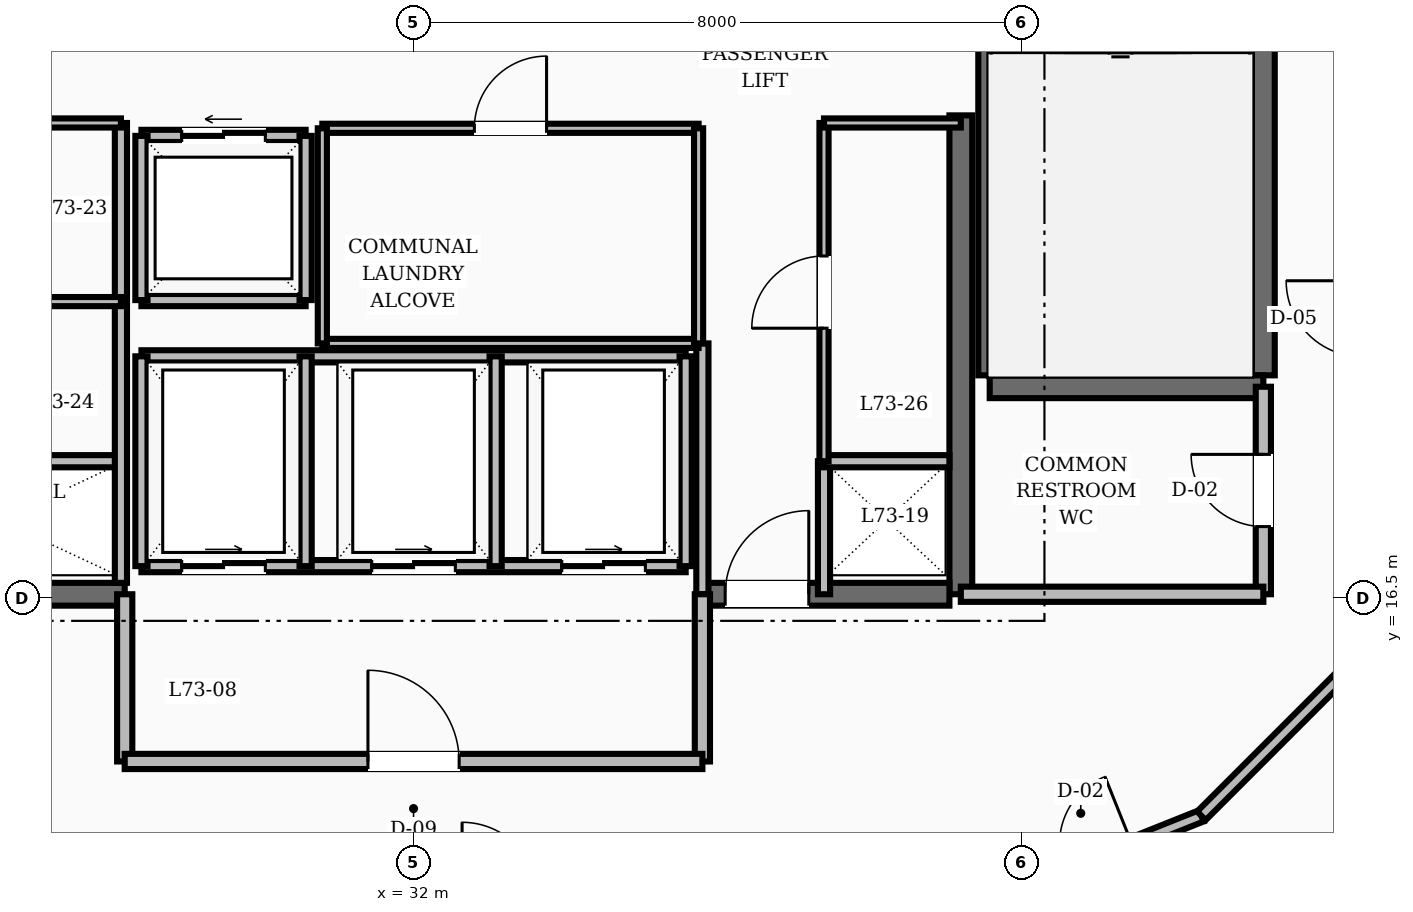
"""IFC4 building model, lengths in metres.
Left out: names, types, materials, properties, quantities, classifications, styles, units other than length and angle.
Written with IfcOpenShell. Run it as: python <this file> out.ifc"""

import sys

from ifc_helpers import new_model, si_unit, direction, frame, frame_2d, origin, place, context, subcontext, project, spatial, rectangle, extrude, element, fill, save


model = new_model("IFC4")
c1 = context("Model", 3, precision=1e-05, world=origin(), true_north=direction((0.0, 1.0)))
c2 = subcontext(c1, "Body", "Model", "MODEL_VIEW")
j1 = project(units=[si_unit("LENGTHUNIT", "METRE"), si_unit("PLANEANGLEUNIT", "RADIAN")], contexts=[c1])
p1 = place(None, origin())
s1 = spatial("IfcSite", under=j1, at=p1, CompositionType="ELEMENT")
p2 = place(p1, origin())
s2 = spatial("IfcBuilding", under=s1, at=p2, CompositionType="ELEMENT")
p3 = place(p2, frame((0.0, 0.0, 279.6)))
s3 = spatial("IfcBuildingStorey", under=s2, at=p3, CompositionType="ELEMENT", Elevation=279.6)
p4 = place(p3, frame((39.2, 16.55, 0.0), z_axis=(0.0, 0.0, 1.0), x_axis=(0.0, 1.0, 0.0)))
e1 = element("IfcWall", 1, at=p4, inside=s3, PredefinedType="SHEAR", context=c2, shape_type="SweptSolid", body=[
    extrude(rectangle(XDim=6.3, YDim=0.3, at=frame_2d((3.15, 0.0))), origin(), (0.0, 0.0, 1.0), 3.6),
])
p5 = place(p3, frame((24.95, 16.55, 0.0), z_axis=(0.0, 0.0, 1.0), x_axis=(1.0, 0.0, 0.0)))
e2 = element("IfcWall", 2, at=p5, inside=s3, PredefinedType="SHEAR", context=c2, shape_type="SweptSolid", body=[
    extrude(rectangle(XDim=3.25, YDim=0.3, at=frame_2d((1.625, 0.0))), origin(), (0.0, 0.0, 1.0), 3.6),
])
p6 = place(p3, frame((35.8, 16.55, 0.0), z_axis=(0.0, 0.0, 1.0), x_axis=(1.0, 0.0, 0.0)))
e3 = element("IfcWall", 3, at=p6, inside=s3, PredefinedType="SHEAR", context=c2, shape_type="SweptSolid", body=[
    extrude(rectangle(XDim=3.25, YDim=0.3, at=frame_2d((1.625, 0.0))), origin(), (0.0, 0.0, 1.0), 3.6),
])
p7 = place(p6, frame((0.3, 0.0, 0.0)))
e4 = element("IfcOpeningElement", 4, at=p7, cuts=e3, PredefinedType="OPENING", context=c2, shape_type="SweptSolid", body=[
    extrude(rectangle(XDim=1.1, YDim=2.1, at=frame_2d((0.55, 1.05))), frame((0.0, 0.16, 0.0), z_axis=(0.0, -1.0, 0.0), x_axis=(1.0, 0.0, 0.0)), (0.0, 0.0, 1.0), 0.32),
])
for number, where, z_axis, x_axis in (
    (5, (43.18, 19.43, 0.0), (0.0, 0.0, 1.0), (0.0, 1.0, 0.0)),
    (6, (39.58, 19.43, 0.0), (0.0, 0.0, 1.0), (0.0, 1.0, 0.0)),
):
    element("IfcWall", number, at=place(p3, frame(where, z_axis=z_axis, x_axis=x_axis)), inside=s3, PredefinedType="SHEAR", context=c2, shape_type="SweptSolid", body=[
        extrude(rectangle(XDim=8.74, YDim=0.3, at=frame_2d((4.37, 0.0))), origin(), (0.0, 0.0, 1.0), 3.6),
    ])
p8 = place(p3, frame((39.58, 19.28, 0.0), z_axis=(0.0, 0.0, 1.0), x_axis=(1.0, 0.0, 0.0)))
e7 = element("IfcWall", 7, at=p8, inside=s3, PredefinedType="SHEAR", context=c2, shape_type="SweptSolid", body=[
    extrude(rectangle(XDim=3.6, YDim=0.3, at=frame_2d((1.8, 0.0))), origin(), (0.0, 0.0, 1.0), 3.6),
])
p9 = place(p3, frame((43.18, 16.55, 0.0), z_axis=(0.0, 0.0, 1.0), x_axis=(0.0, 1.0, 0.0)))
e8 = element("IfcWall", 8, at=p9, inside=s3, PredefinedType="SOLIDWALL", context=c2, shape_type="SweptSolid", body=[
    extrude(rectangle(XDim=2.73, YDim=0.2, at=frame_2d((1.365, 0.0))), origin(), (0.0, 0.0, 1.0), 2.87),
])
p10 = place(p9, frame((0.89, 0.0, 0.0)))
e9 = element("IfcOpeningElement", 9, at=p10, cuts=e8, PredefinedType="OPENING", context=c2, shape_type="SweptSolid", body=[
    extrude(rectangle(XDim=0.95, YDim=2.1, at=frame_2d((0.475, 1.05))), frame((0.0, 0.11, 0.0), z_axis=(0.0, -1.0, 0.0), x_axis=(1.0, 0.0, 0.0)), (0.0, 0.0, 1.0), 0.22),
])
p11 = place(p3, frame((39.2, 16.55, 0.0), z_axis=(0.0, 0.0, 1.0), x_axis=(1.0, 0.0, 0.0)))
e10 = element("IfcWall", 10, at=p11, inside=s3, PredefinedType="SOLIDWALL", context=c2, shape_type="SweptSolid", body=[
    extrude(rectangle(XDim=3.98, YDim=0.2, at=frame_2d((1.99, 0.0))), origin(), (0.0, 0.0, 1.0), 2.87),
])
p12 = place(p3, frame((35.8, 16.55, 0.0), z_axis=(0.0, 0.0, 1.0), x_axis=(0.0, 1.0, 0.0)))
e11 = element("IfcWall", 11, at=p12, inside=s3, PredefinedType="SOLIDWALL", context=c2, shape_type="SweptSolid", body=[
    extrude(rectangle(XDim=3.3, YDim=0.16, at=frame_2d((1.65, 0.0))), origin(), (0.0, 0.0, 1.0), 2.87),
])
p13 = place(p3, frame((37.4, 16.55, 0.0), z_axis=(0.0, 0.0, 1.0), x_axis=(0.0, 1.0, 0.0)))
e12 = element("IfcWall", 12, at=p13, inside=s3, PredefinedType="SOLIDWALL", context=c2, shape_type="SweptSolid", body=[
    extrude(rectangle(XDim=1.75, YDim=0.16, at=frame_2d((0.875, 0.0))), origin(), (0.0, 0.0, 1.0), 2.87),
])
for number, where, z_axis, x_axis in (
    (13, (28.2, 14.35, 0.0), (0.0, 0.0, 1.0), (0.0, 1.0, 0.0)),
    (14, (35.8, 14.35, 0.0), (0.0, 0.0, 1.0), (0.0, 1.0, 0.0)),
):
    element("IfcWall", number, at=place(p3, frame(where, z_axis=z_axis, x_axis=x_axis)), inside=s3, PredefinedType="SOLIDWALL", context=c2, shape_type="SweptSolid", body=[
        extrude(rectangle(XDim=2.2, YDim=0.2, at=frame_2d((1.1, 0.0))), origin(), (0.0, 0.0, 1.0), 2.87),
    ])
p14 = place(p3, frame((28.2, 14.35, 0.0), z_axis=(0.0, 0.0, 1.0), x_axis=(1.0, 0.0, 0.0)))
e15 = element("IfcWall", 15, at=p14, inside=s3, PredefinedType="SOLIDWALL", context=c2, shape_type="SweptSolid", body=[
    extrude(rectangle(XDim=7.6, YDim=0.2, at=frame_2d((3.8, 0.0))), origin(), (0.0, 0.0, 1.0), 2.87),
])
p15 = place(p14, frame((3.2, 0.0, 0.0)))
e16 = element("IfcOpeningElement", 16, at=p15, cuts=e15, PredefinedType="OPENING", context=c2, shape_type="SweptSolid", body=[
    extrude(rectangle(XDim=1.2, YDim=2.1, at=frame_2d((0.6, 1.05))), frame((0.0, 0.11, 0.0), z_axis=(0.0, -1.0, 0.0), x_axis=(1.0, 0.0, 0.0)), (0.0, 0.0, 1.0), 0.22),
])
p16 = place(p3, frame((28.42, 22.58, 0.0), z_axis=(0.0, 0.0, 1.0), x_axis=(1.0, 0.0, 0.0)))
e17 = element("IfcWall", 17, at=p16, inside=s3, PredefinedType="SOLIDWALL", context=c2, shape_type="SweptSolid", body=[
    extrude(rectangle(XDim=2.16, YDim=0.16, at=frame_2d((1.08, 0.0))), origin(), (0.0, 0.0, 1.0), 2.87),
])
p17 = place(p16, frame((0.53, 0.0, 0.0)))
e18 = element("IfcOpeningElement", 18, at=p17, cuts=e17, PredefinedType="OPENING", context=c2, shape_type="SweptSolid", body=[
    extrude(rectangle(XDim=1.1, YDim=2.15, at=frame_2d((0.55, 1.075))), frame((0.0, 0.09, 0.0), z_axis=(0.0, -1.0, 0.0), x_axis=(1.0, 0.0, 0.0)), (0.0, 0.0, 1.0), 0.18),
])
for number, where, z_axis, x_axis in (
    (19, (28.42, 20.42, 0.0), (0.0, 0.0, 1.0), (1.0, 0.0, 0.0)),
    (20, (28.42, 20.42, 0.0), (0.0, 0.0, 1.0), (0.0, 1.0, 0.0)),
    (21, (30.58, 20.42, 0.0), (0.0, 0.0, 1.0), (0.0, 1.0, 0.0)),
):
    element("IfcWall", number, at=place(p3, frame(where, z_axis=z_axis, x_axis=x_axis)), inside=s3, PredefinedType="SOLIDWALL", context=c2, shape_type="SweptSolid", body=[
        extrude(rectangle(XDim=2.16, YDim=0.16, at=frame_2d((1.08, 0.0))), origin(), (0.0, 0.0, 1.0), 2.87),
    ])
p18 = place(p3, frame((28.42, 16.92, 0.0), z_axis=(0.0, 0.0, 1.0), x_axis=(1.0, 0.0, 0.0)))
e22 = element("IfcWall", 22, at=p18, inside=s3, PredefinedType="SOLIDWALL", context=c2, shape_type="SweptSolid", body=[
    extrude(rectangle(XDim=7.16, YDim=0.16, at=frame_2d((3.58, 0.0))), origin(), (0.0, 0.0, 1.0), 2.87),
])
p19 = place(p18, frame((0.53, 0.0, 0.0)))
e23 = element("IfcOpeningElement", 23, at=p19, cuts=e22, PredefinedType="OPENING", context=c2, shape_type="SweptSolid", body=[
    extrude(rectangle(XDim=1.1, YDim=2.15, at=frame_2d((0.55, 1.075))), frame((0.0, 0.09, 0.0), z_axis=(0.0, -1.0, 0.0), x_axis=(1.0, 0.0, 0.0)), (0.0, 0.0, 1.0), 0.18),
])
p20 = place(p18, frame((3.03, 0.0, 0.0)))
e24 = element("IfcOpeningElement", 24, at=p20, cuts=e22, PredefinedType="OPENING", context=c2, shape_type="SweptSolid", body=[
    extrude(rectangle(XDim=1.1, YDim=2.15, at=frame_2d((0.55, 1.075))), frame((0.0, 0.09, 0.0), z_axis=(0.0, -1.0, 0.0), x_axis=(1.0, 0.0, 0.0)), (0.0, 0.0, 1.0), 0.18),
])
p21 = place(p18, frame((5.53, 0.0, 0.0)))
e25 = element("IfcOpeningElement", 25, at=p21, cuts=e22, PredefinedType="OPENING", context=c2, shape_type="SweptSolid", body=[
    extrude(rectangle(XDim=1.1, YDim=2.15, at=frame_2d((0.55, 1.075))), frame((0.0, 0.09, 0.0), z_axis=(0.0, -1.0, 0.0), x_axis=(1.0, 0.0, 0.0)), (0.0, 0.0, 1.0), 0.18),
])
p22 = place(p3, frame((28.42, 19.68, 0.0), z_axis=(0.0, 0.0, 1.0), x_axis=(1.0, 0.0, 0.0)))
e26 = element("IfcWall", 26, at=p22, inside=s3, PredefinedType="SOLIDWALL", context=c2, shape_type="SweptSolid", body=[
    extrude(rectangle(XDim=7.16, YDim=0.16, at=frame_2d((3.58, 0.0))), origin(), (0.0, 0.0, 1.0), 2.87),
])
for number, where, z_axis, x_axis in (
    (27, (28.42, 16.92, 0.0), (0.0, 0.0, 1.0), (0.0, 1.0, 0.0)),
    (28, (30.58, 16.92, 0.0), (0.0, 0.0, 1.0), (0.0, 1.0, 0.0)),
    (29, (33.08, 16.92, 0.0), (0.0, 0.0, 1.0), (0.0, 1.0, 0.0)),
    (30, (35.58, 16.92, 0.0), (0.0, 0.0, 1.0), (0.0, 1.0, 0.0)),
):
    element("IfcWall", number, at=place(p3, frame(where, z_axis=z_axis, x_axis=x_axis)), inside=s3, PredefinedType="SOLIDWALL", context=c2, shape_type="SweptSolid", body=[
        extrude(rectangle(XDim=2.76, YDim=0.16, at=frame_2d((1.38, 0.0))), origin(), (0.0, 0.0, 1.0), 2.87),
    ])
p23 = place(p3, frame((30.8, 22.68, 0.0), z_axis=(0.0, 0.0, 1.0), x_axis=(1.0, 0.0, 0.0)))
e31 = element("IfcWall", 31, at=p23, inside=s3, PredefinedType="PARTITIONING", context=c2, shape_type="SweptSolid", body=[
    extrude(rectangle(XDim=4.95, YDim=0.12, at=frame_2d((2.475, 0.0))), origin(), (0.0, 0.0, 1.0), 2.87),
])
p24 = place(p23, frame((2.0, 0.0, 0.0)))
e32 = element("IfcOpeningElement", 32, at=p24, cuts=e31, PredefinedType="OPENING", context=c2, shape_type="SweptSolid", body=[
    extrude(rectangle(XDim=0.95, YDim=2.1, at=frame_2d((0.475, 1.05))), frame((0.0, 0.07, 0.0), z_axis=(0.0, -1.0, 0.0), x_axis=(1.0, 0.0, 0.0)), (0.0, 0.0, 1.0), 0.14),
])
p25 = place(p3, frame((30.8, 19.85, 0.0), z_axis=(0.0, 0.0, 1.0), x_axis=(1.0, 0.0, 0.0)))
e33 = element("IfcWall", 33, at=p25, inside=s3, PredefinedType="PARTITIONING", context=c2, shape_type="SweptSolid", body=[
    extrude(rectangle(XDim=4.95, YDim=0.12, at=frame_2d((2.475, 0.0))), origin(), (0.0, 0.0, 1.0), 2.87),
])
for number, where, z_axis, x_axis in (
    (34, (30.8, 19.85, 0.0), (0.0, 0.0, 1.0), (0.0, 1.0, 0.0)),
    (35, (35.75, 19.85, 0.0), (0.0, 0.0, 1.0), (0.0, 1.0, 0.0)),
):
    element("IfcWall", number, at=place(p3, frame(where, z_axis=z_axis, x_axis=x_axis)), inside=s3, PredefinedType="PARTITIONING", context=c2, shape_type="SweptSolid", body=[
        extrude(rectangle(XDim=2.83, YDim=0.12, at=frame_2d((1.415, 0.0))), origin(), (0.0, 0.0, 1.0), 2.87),
    ])
p26 = place(p3, frame((24.95, 18.3, 0.0), z_axis=(0.0, 0.0, 1.0), x_axis=(1.0, 0.0, 0.0)))
e36 = element("IfcWall", 36, at=p26, inside=s3, PredefinedType="SOLIDWALL", context=c2, shape_type="SweptSolid", body=[
    extrude(rectangle(XDim=3.2, YDim=0.16, at=frame_2d((1.6, 0.0))), origin(), (0.0, 0.0, 1.0), 2.87),
])
p27 = place(p3, frame((28.15, 16.7, 0.0), z_axis=(0.0, 0.0, 1.0), x_axis=(0.0, 1.0, 0.0)))
e37 = element("IfcWall", 37, at=p27, inside=s3, PredefinedType="SOLIDWALL", context=c2, shape_type="SweptSolid", body=[
    extrude(rectangle(XDim=6.05, YDim=0.16, at=frame_2d((3.025, 0.0))), origin(), (0.0, 0.0, 1.0), 2.87),
])
p28 = place(p3, frame((37.4, 18.3, 0.0), z_axis=(0.0, 0.0, 1.0), x_axis=(1.0, 0.0, 0.0)))
e38 = element("IfcWall", 38, at=p28, inside=s3, PredefinedType="SOLIDWALL", context=c2, shape_type="SweptSolid", body=[
    extrude(rectangle(XDim=1.65, YDim=0.16, at=frame_2d((0.825, 0.0))), origin(), (0.0, 0.0, 1.0), 2.87),
])
p29 = place(p3, frame((24.95, 22.75, 0.0), z_axis=(0.0, 0.0, 1.0), x_axis=(1.0, 0.0, 0.0)))
e39 = element("IfcWall", 39, at=p29, inside=s3, PredefinedType="PARTITIONING", context=c2, shape_type="SweptSolid", body=[
    extrude(rectangle(XDim=3.2, YDim=0.12, at=frame_2d((1.6, 0.0))), origin(), (0.0, 0.0, 1.0), 2.87),
])
p30 = place(p29, frame((1.125, 0.0, 0.0)))
e40 = element("IfcOpeningElement", 40, at=p30, cuts=e39, PredefinedType="OPENING", context=c2, shape_type="SweptSolid", body=[
    extrude(rectangle(XDim=0.95, YDim=2.1, at=frame_2d((0.475, 1.05))), frame((0.0, 0.07, 0.0), z_axis=(0.0, -1.0, 0.0), x_axis=(1.0, 0.0, 0.0)), (0.0, 0.0, 1.0), 0.14),
])
p31 = place(p3, frame((37.4, 18.3, 0.0), z_axis=(0.0, 0.0, 1.0), x_axis=(0.0, 1.0, 0.0)))
e41 = element("IfcWall", 41, at=p31, inside=s3, PredefinedType="PARTITIONING", context=c2, shape_type="SweptSolid", body=[
    extrude(rectangle(XDim=4.45, YDim=0.12, at=frame_2d((2.225, 0.0))), origin(), (0.0, 0.0, 1.0), 2.87),
])
p32 = place(p31, frame((1.75, 0.0, 0.0)))
e42 = element("IfcOpeningElement", 42, at=p32, cuts=e41, PredefinedType="OPENING", context=c2, shape_type="SweptSolid", body=[
    extrude(rectangle(XDim=0.95, YDim=2.1, at=frame_2d((0.475, 1.05))), frame((0.0, 0.07, 0.0), z_axis=(0.0, -1.0, 0.0), x_axis=(1.0, 0.0, 0.0)), (0.0, 0.0, 1.0), 0.14),
])
p33 = place(p3, frame((37.4, 22.75, 0.0), z_axis=(0.0, 0.0, 1.0), x_axis=(1.0, 0.0, 0.0)))
e43 = element("IfcWall", 43, at=p33, inside=s3, PredefinedType="PARTITIONING", context=c2, shape_type="SweptSolid", body=[
    extrude(rectangle(XDim=1.8, YDim=0.12, at=frame_2d((0.9, 0.0))), origin(), (0.0, 0.0, 1.0), 2.87),
])
p34 = place(p3, frame((24.95, 20.4, 0.0), z_axis=(0.0, 0.0, 1.0), x_axis=(1.0, 0.0, 0.0)))
e44 = element("IfcWall", 44, at=p34, inside=s3, PredefinedType="PARTITIONING", context=c2, shape_type="SweptSolid", body=[
    extrude(rectangle(XDim=3.2, YDim=0.12, at=frame_2d((1.6, 0.0))), origin(), (0.0, 0.0, 1.0), 2.87),
])
p35 = place(p34, frame((1.125, 0.0, 0.0)))
e45 = element("IfcOpeningElement", 45, at=p35, cuts=e44, PredefinedType="OPENING", context=c2, shape_type="SweptSolid", body=[
    extrude(rectangle(XDim=0.95, YDim=2.1, at=frame_2d((0.475, 1.05))), frame((0.0, 0.07, 0.0), z_axis=(0.0, -1.0, 0.0), x_axis=(1.0, 0.0, 0.0)), (0.0, 0.0, 1.0), 0.14),
])
p36 = place(p3, frame((39.651, 12.55, 0.0), z_axis=(0.0, 0.0, 1.0), x_axis=(0.92856882165, 0.371160266542, 0.0)))
e46 = element("IfcWall", 46, at=p36, inside=s3, PredefinedType="SOLIDWALL", context=c2, shape_type="SweptSolid", body=[
    extrude(rectangle(XDim=2.923, YDim=0.16, at=frame_2d((1.461, 0.0))), origin(), (0.0, 0.0, 1.0), 2.87),
])
p37 = place(p36, frame((0.987, 0.0, 0.0)))
e47 = element("IfcOpeningElement", 47, at=p37, cuts=e46, PredefinedType="OPENING", context=c2, shape_type="SweptSolid", body=[
    extrude(rectangle(XDim=0.95, YDim=2.1, at=frame_2d((0.475, 1.05))), frame((0.0, 0.09, 0.0), z_axis=(0.0, -1.0, 0.0), x_axis=(1.0, 0.0, 0.0)), (0.0, 0.0, 1.0), 0.18),
])
p38 = place(p3, frame((42.365, 13.635, 0.0), z_axis=(0.0, 0.0, 1.0), x_axis=(0.707106781187, 0.707106781187, 0.0)))
e48 = element("IfcWall", 48, at=p38, inside=s3, PredefinedType="SOLIDWALL", context=c2, shape_type="SweptSolid", body=[
    extrude(rectangle(XDim=2.916, YDim=0.16, at=frame_2d((1.458, 0.0))), origin(), (0.0, 0.0, 1.0), 2.87),
])
p39 = place(p3, frame((44.146, 10.687, 0.0), z_axis=(0.0, 0.0, 1.0), x_axis=(0.617150729588, 0.786844951035, 0.0)))
e49 = element("IfcWall", 49, at=p39, inside=s3, PredefinedType="PARTITIONING", context=c2, shape_type="SweptSolid", body=[
    extrude(rectangle(XDim=3.569, YDim=0.12, at=frame_2d((1.785, 0.0))), origin(), (0.0, 0.0, 1.0), 2.87),
])
p40 = place(p10, origin())
e50 = element("IfcDoor", 50, at=p40, inside=s3, OperationType="SINGLE_SWING_RIGHT", PredefinedType="DOOR", context=c2, shape_type="SweptSolid", body=[
    extrude(rectangle(XDim=0.95, YDim=2.1, at=frame_2d((0.475, 1.05))), frame((0.0, 0.025, 0.0), z_axis=(0.0, -1.0, 0.0), x_axis=(1.0, 0.0, 0.0)), (0.0, 0.0, 1.0), 0.05),
])
fill(e9, e50)
p41 = place(p7, origin())
e51 = element("IfcDoor", 51, at=p41, inside=s3, OperationType="SINGLE_SWING_RIGHT", PredefinedType="DOOR", context=c2, shape_type="SweptSolid", body=[
    extrude(rectangle(XDim=1.1, YDim=2.1, at=frame_2d((0.55, 1.05))), frame((0.0, 0.025, 0.0), z_axis=(0.0, -1.0, 0.0), x_axis=(1.0, 0.0, 0.0)), (0.0, 0.0, 1.0), 0.05),
])
fill(e4, e51)
p42 = place(p15, origin())
e52 = element("IfcDoor", 52, at=p42, inside=s3, OperationType="SINGLE_SWING_LEFT", PredefinedType="DOOR", context=c2, shape_type="SweptSolid", body=[
    extrude(rectangle(XDim=1.2, YDim=2.1, at=frame_2d((0.6, 1.05))), frame((0.0, 0.025, 0.0), z_axis=(0.0, -1.0, 0.0), x_axis=(1.0, 0.0, 0.0)), (0.0, 0.0, 1.0), 0.05),
])
fill(e16, e52)
p43 = place(p17, origin())
e53 = element("IfcDoor", 53, at=p43, inside=s3, OperationType="SLIDING_TO_LEFT", PredefinedType="DOOR", context=c2, shape_type="SweptSolid", body=[
    extrude(rectangle(XDim=1.1, YDim=2.15, at=frame_2d((0.55, 1.075))), frame((0.0, 0.025, 0.0), z_axis=(0.0, -1.0, 0.0), x_axis=(1.0, 0.0, 0.0)), (0.0, 0.0, 1.0), 0.05),
])
fill(e18, e53)
p44 = place(p19, origin())
e54 = element("IfcDoor", 54, at=p44, inside=s3, OperationType="SLIDING_TO_RIGHT", PredefinedType="DOOR", context=c2, shape_type="SweptSolid", body=[
    extrude(rectangle(XDim=1.1, YDim=2.15, at=frame_2d((0.55, 1.075))), frame((0.0, 0.025, 0.0), z_axis=(0.0, -1.0, 0.0), x_axis=(1.0, 0.0, 0.0)), (0.0, 0.0, 1.0), 0.05),
])
fill(e23, e54)
p45 = place(p20, origin())
e55 = element("IfcDoor", 55, at=p45, inside=s3, OperationType="SLIDING_TO_RIGHT", PredefinedType="DOOR", context=c2, shape_type="SweptSolid", body=[
    extrude(rectangle(XDim=1.1, YDim=2.15, at=frame_2d((0.55, 1.075))), frame((0.0, 0.025, 0.0), z_axis=(0.0, -1.0, 0.0), x_axis=(1.0, 0.0, 0.0)), (0.0, 0.0, 1.0), 0.05),
])
fill(e24, e55)
p46 = place(p21, origin())
e56 = element("IfcDoor", 56, at=p46, inside=s3, OperationType="SLIDING_TO_RIGHT", PredefinedType="DOOR", context=c2, shape_type="SweptSolid", body=[
    extrude(rectangle(XDim=1.1, YDim=2.15, at=frame_2d((0.55, 1.075))), frame((0.0, 0.025, 0.0), z_axis=(0.0, -1.0, 0.0), x_axis=(1.0, 0.0, 0.0)), (0.0, 0.0, 1.0), 0.05),
])
fill(e25, e56)
p47 = place(p24, origin())
e57 = element("IfcDoor", 57, at=p47, inside=s3, OperationType="SINGLE_SWING_RIGHT", PredefinedType="DOOR", context=c2, shape_type="SweptSolid", body=[
    extrude(rectangle(XDim=0.95, YDim=2.1, at=frame_2d((0.475, 1.05))), frame((0.0, 0.025, 0.0), z_axis=(0.0, -1.0, 0.0), x_axis=(1.0, 0.0, 0.0)), (0.0, 0.0, 1.0), 0.05),
])
fill(e32, e57)
p48 = place(p32, origin())
e58 = element("IfcDoor", 58, at=p48, inside=s3, OperationType="SINGLE_SWING_LEFT", PredefinedType="DOOR", context=c2, shape_type="SweptSolid", body=[
    extrude(rectangle(XDim=0.95, YDim=2.1, at=frame_2d((0.475, 1.05))), frame((0.0, 0.025, 0.0), z_axis=(0.0, -1.0, 0.0), x_axis=(1.0, 0.0, 0.0)), (0.0, 0.0, 1.0), 0.05),
])
fill(e42, e58)
save(model, sys.argv[1])
